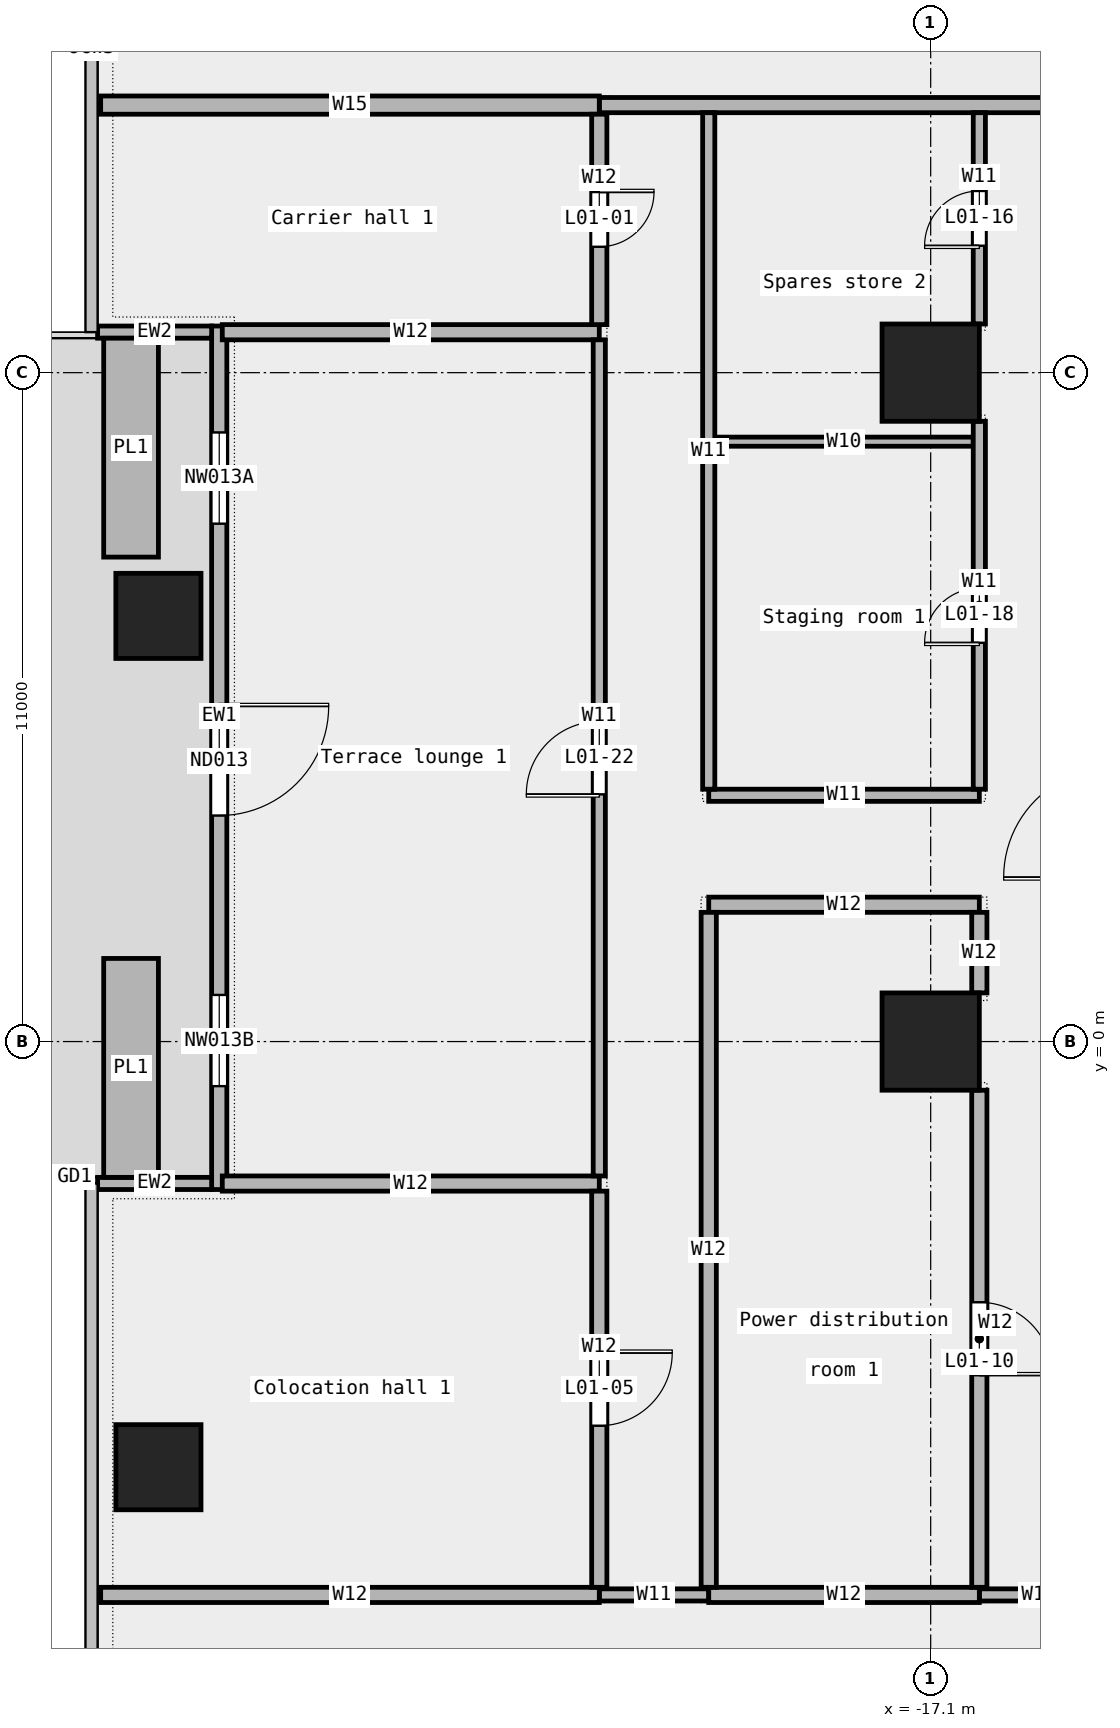
"""IFC4 building model, lengths in metres.
Left out: names, types, materials, properties, quantities, classifications, styles, units other than length and angle.
Written with IfcOpenShell. Run it as: python <this file> out.ifc"""

import sys

from ifc_helpers import new_model, si_unit, direction, frame, frame_2d, origin, origin_2d, place, context, subcontext, project, spatial, rectangle, extrude, element, fill, save


model = new_model("IFC4")
c1 = context("Model", 3, precision=1e-05, world=origin(), true_north=direction((0.0, 1.0)))
c2 = subcontext(c1, "Body", "Model", "MODEL_VIEW")
j1 = project(units=[si_unit("LENGTHUNIT", "METRE"), si_unit("PLANEANGLEUNIT", "RADIAN")], contexts=[c1])
p1 = place(None, origin())
s1 = spatial("IfcSite", under=j1, at=p1, CompositionType="ELEMENT")
p2 = place(p1, origin())
s2 = spatial("IfcBuilding", under=s1, at=p2, CompositionType="ELEMENT")
p3 = place(p2, frame((0.0, 0.0, 9.0)))
s3 = spatial("IfcBuildingStorey", under=s2, at=p3, CompositionType="ELEMENT", Elevation=9.0)
for number, where, z_axis, x_axis in (
    (1, (-29.8, 7.0, 0.0), (0.0, 0.0, 1.0), (1.0, 0.0, 0.0)),
    (2, (-29.8, -7.0, 0.0), (0.0, 0.0, 1.0), (1.0, 0.0, 0.0)),
):
    element("IfcColumn", number, at=place(p3, frame(where, z_axis=z_axis, x_axis=x_axis)), inside=s3, PredefinedType="COLUMN", context=c2, shape_type="SweptSolid", body=[
        extrude(rectangle(XDim=1.4, YDim=1.4, at=origin_2d()), origin(), (0.0, 0.0, 1.0), 5.0),
    ])
for number, where, z_axis, x_axis in (
    (3, (-17.1, 0.0, 0.0), (0.0, 0.0, 1.0), (1.0, 0.0, 0.0)),
    (4, (-17.1, 11.0, 0.0), (0.0, 0.0, 1.0), (1.0, 0.0, 0.0)),
):
    element("IfcColumn", number, at=place(p3, frame(where, z_axis=z_axis, x_axis=x_axis)), inside=s3, PredefinedType="COLUMN", context=c2, shape_type="SweptSolid", body=[
        extrude(rectangle(XDim=1.6, YDim=1.6, at=origin_2d()), origin(), (0.0, 0.0, 1.0), 5.0),
    ])
p4 = place(p3, frame((-28.8, 11.767, 0.0), z_axis=(0.0, 0.0, 1.0), x_axis=(0.0, -1.0, 0.0)))
e5 = element("IfcWall", 5, at=p4, inside=s3, PredefinedType="STANDARD", context=c2, shape_type="SweptSolid", body=[
    extrude(rectangle(XDim=14.2, YDim=0.25, at=frame_2d((7.1, 0.0))), origin(), (0.0, 0.0, 1.0), 5.0),
])
p5 = place(p4, frame((1.75, 0.0, 0.45)))
e6 = element("IfcOpeningElement", 6, at=p5, cuts=e5, PredefinedType="OPENING", context=c2, shape_type="SweptSolid", body=[
    extrude(rectangle(XDim=1.5, YDim=3.0, at=frame_2d((0.75, 1.5))), frame((0.0, 0.137, 0.0), z_axis=(0.0, -1.0, 0.0), x_axis=(1.0, 0.0, 0.0)), (0.0, 0.0, 1.0), 0.274),
])
p6 = place(p4, frame((6.25, 0.0, 0.0)))
e7 = element("IfcOpeningElement", 7, at=p6, cuts=e5, PredefinedType="OPENING", context=c2, shape_type="SweptSolid", body=[
    extrude(rectangle(XDim=1.8, YDim=2.4, at=frame_2d((0.9, 1.2))), frame((0.0, 0.137, 0.0), z_axis=(0.0, -1.0, 0.0), x_axis=(1.0, 0.0, 0.0)), (0.0, 0.0, 1.0), 0.274),
])
p7 = place(p4, frame((11.0, 0.0, 0.45)))
e8 = element("IfcOpeningElement", 8, at=p7, cuts=e5, PredefinedType="OPENING", context=c2, shape_type="SweptSolid", body=[
    extrude(rectangle(XDim=1.5, YDim=3.0, at=frame_2d((0.75, 1.5))), frame((0.0, 0.137, 0.0), z_axis=(0.0, -1.0, 0.0), x_axis=(1.0, 0.0, 0.0)), (0.0, 0.0, 1.0), 0.274),
])
for number, where, z_axis, x_axis in (
    (9, (-30.8, 11.667, 0.0), (0.0, 0.0, 1.0), (1.0, 0.0, 0.0)),
    (10, (-30.8, -2.333, 0.0), (0.0, 0.0, 1.0), (1.0, 0.0, 0.0)),
):
    element("IfcWall", number, at=place(p3, frame(where, z_axis=z_axis, x_axis=x_axis)), inside=s3, PredefinedType="STANDARD", context=c2, shape_type="SweptSolid", body=[
        extrude(rectangle(XDim=1.875, YDim=0.2, at=frame_2d((0.938, 0.0))), origin(), (0.0, 0.0, 1.0), 5.0),
    ])
for number, where, z_axis, x_axis in (
    (11, (-30.25, 11.567, 0.0), (0.0, 0.0, 1.0), (0.0, -1.0, 0.0)),
    (12, (-30.25, 1.367, 0.0), (0.0, 0.0, 1.0), (0.0, -1.0, 0.0)),
):
    element("IfcWall", number, at=place(p3, frame(where, z_axis=z_axis, x_axis=x_axis)), inside=s3, PredefinedType="STANDARD", context=c2, shape_type="SweptSolid", body=[
        extrude(rectangle(XDim=3.6, YDim=0.9, at=frame_2d((1.8, 0.0))), origin(), (0.0, 0.0, 1.0), 0.7),
    ])
p8 = place(p3, frame((-22.55, -9.1, 0.0), z_axis=(0.0, 0.0, 1.0), x_axis=(1.0, 0.0, 0.0)))
e13 = element("IfcWall", 13, at=p8, inside=s3, PredefinedType="PARTITIONING", context=c2, shape_type="SweptSolid", body=[
    extrude(rectangle(XDim=1.8, YDim=0.2, at=frame_2d((0.9, 0.0))), origin(), (0.0, 0.0, 1.0), 5.0),
])
p9 = place(p3, frame((-16.3, -9.1, 0.0), z_axis=(0.0, 0.0, 1.0), x_axis=(1.0, 0.0, 0.0)))
e14 = element("IfcWall", 14, at=p9, inside=s3, PredefinedType="PARTITIONING", context=c2, shape_type="SweptSolid", body=[
    extrude(rectangle(XDim=1.96, YDim=0.2, at=frame_2d((0.98, 0.0))), origin(), (0.0, 0.0, 1.0), 5.0),
])
p10 = place(p3, frame((-30.75, -9.1, 0.0), z_axis=(0.0, 0.0, 1.0), x_axis=(1.0, 0.0, 0.0)))
e15 = element("IfcWall", 15, at=p10, inside=s3, PredefinedType="PARTITIONING", context=c2, shape_type="SweptSolid", body=[
    extrude(rectangle(XDim=8.2, YDim=0.25, at=frame_2d((4.1, 0.0))), origin(), (0.0, 0.0, 1.0), 5.0),
])
p11 = place(p3, frame((-20.75, -9.1, 0.0), z_axis=(0.0, 0.0, 1.0), x_axis=(1.0, 0.0, 0.0)))
e16 = element("IfcWall", 16, at=p11, inside=s3, PredefinedType="PARTITIONING", context=c2, shape_type="SweptSolid", body=[
    extrude(rectangle(XDim=4.45, YDim=0.25, at=frame_2d((2.225, 0.0))), origin(), (0.0, 0.0, 1.0), 5.0),
])
p12 = place(p3, frame((-28.75, -2.335, 0.0), z_axis=(0.0, 0.0, 1.0), x_axis=(1.0, 0.0, 0.0)))
e17 = element("IfcWall", 17, at=p12, inside=s3, PredefinedType="PARTITIONING", context=c2, shape_type="SweptSolid", body=[
    extrude(rectangle(XDim=6.2, YDim=0.25, at=frame_2d((3.1, 0.0))), origin(), (0.0, 0.0, 1.0), 5.0),
])
p13 = place(p3, frame((-20.75, 2.25, 0.0), z_axis=(0.0, 0.0, 1.0), x_axis=(1.0, 0.0, 0.0)))
e18 = element("IfcWall", 18, at=p13, inside=s3, PredefinedType="PARTITIONING", context=c2, shape_type="SweptSolid", body=[
    extrude(rectangle(XDim=4.45, YDim=0.25, at=frame_2d((2.225, 0.0))), origin(), (0.0, 0.0, 1.0), 5.0),
])
p14 = place(p3, frame((-20.75, 4.05, 0.0), z_axis=(0.0, 0.0, 1.0), x_axis=(1.0, 0.0, 0.0)))
e19 = element("IfcWall", 19, at=p14, inside=s3, PredefinedType="PARTITIONING", context=c2, shape_type="SweptSolid", body=[
    extrude(rectangle(XDim=4.45, YDim=0.2, at=frame_2d((2.225, 0.0))), origin(), (0.0, 0.0, 1.0), 5.0),
])
p15 = place(p3, frame((-20.65, 9.865, 0.0), z_axis=(0.0, 0.0, 1.0), x_axis=(1.0, 0.0, 0.0)))
e20 = element("IfcWall", 20, at=p15, inside=s3, PredefinedType="PARTITIONING", context=c2, shape_type="SweptSolid", body=[
    extrude(rectangle(XDim=4.25, YDim=0.15, at=frame_2d((2.125, 0.0))), origin(), (0.0, 0.0, 1.0), 5.0),
])
p16 = place(p3, frame((-28.75, 11.665, 0.0), z_axis=(0.0, 0.0, 1.0), x_axis=(1.0, 0.0, 0.0)))
e21 = element("IfcWall", 21, at=p16, inside=s3, PredefinedType="PARTITIONING", context=c2, shape_type="SweptSolid", body=[
    extrude(rectangle(XDim=6.2, YDim=0.25, at=frame_2d((3.1, 0.0))), origin(), (0.0, 0.0, 1.0), 5.0),
])
p17 = place(p3, frame((-22.55, 15.4, 0.0), z_axis=(0.0, 0.0, 1.0), x_axis=(1.0, 0.0, 0.0)))
e22 = element("IfcWall", 22, at=p17, inside=s3, PredefinedType="PARTITIONING", context=c2, shape_type="SweptSolid", body=[
    extrude(rectangle(XDim=31.715, YDim=0.25, at=frame_2d((15.857, 0.0))), origin(), (0.0, 0.0, 1.0), 5.0),
])
p18 = place(p17, frame((12.485, 0.0, 0.0)))
e23 = element("IfcOpeningElement", 23, at=p18, cuts=e22, PredefinedType="OPENING", context=c2, shape_type="SweptSolid", body=[
    extrude(rectangle(XDim=1.8, YDim=2.1, at=frame_2d((0.9, 1.05))), frame((0.0, 0.137, 0.0), z_axis=(0.0, -1.0, 0.0), x_axis=(1.0, 0.0, 0.0)), (0.0, 0.0, 1.0), 0.274),
])
p19 = place(p17, frame((24.705, 0.0, 0.0)))
e24 = element("IfcOpeningElement", 24, at=p19, cuts=e22, PredefinedType="OPENING", context=c2, shape_type="SweptSolid", body=[
    extrude(rectangle(XDim=1.8, YDim=2.1, at=frame_2d((0.9, 1.05))), frame((0.0, 0.137, 0.0), z_axis=(0.0, -1.0, 0.0), x_axis=(1.0, 0.0, 0.0)), (0.0, 0.0, 1.0), 0.274),
])
p20 = place(p3, frame((-30.75, 15.4, 0.0), z_axis=(0.0, 0.0, 1.0), x_axis=(1.0, 0.0, 0.0)))
e25 = element("IfcWall", 25, at=p20, inside=s3, PredefinedType="PARTITIONING", context=c2, shape_type="SweptSolid", body=[
    extrude(rectangle(XDim=8.2, YDim=0.3, at=frame_2d((4.1, 0.0))), origin(), (0.0, 0.0, 1.0), 5.0),
])
p21 = place(p3, frame((-22.55, -2.21, 0.0), z_axis=(0.0, 0.0, 1.0), x_axis=(0.0, 1.0, 0.0)))
e26 = element("IfcWall", 26, at=p21, inside=s3, PredefinedType="PARTITIONING", context=c2, shape_type="SweptSolid", body=[
    extrude(rectangle(XDim=13.75, YDim=0.2, at=frame_2d((6.875, 0.0))), origin(), (0.0, 0.0, 1.0), 5.0),
])
p22 = place(p21, frame((6.275, 0.0, 0.0)))
e27 = element("IfcOpeningElement", 27, at=p22, cuts=e26, PredefinedType="OPENING", context=c2, shape_type="SweptSolid", body=[
    extrude(rectangle(XDim=1.2, YDim=2.1, at=frame_2d((0.6, 1.05))), frame((0.0, 0.112, 0.0), z_axis=(0.0, -1.0, 0.0), x_axis=(1.0, 0.0, 0.0)), (0.0, 0.0, 1.0), 0.224),
])
p23 = place(p3, frame((-22.55, -8.975, 0.0), z_axis=(0.0, 0.0, 1.0), x_axis=(0.0, 1.0, 0.0)))
e28 = element("IfcWall", 28, at=p23, inside=s3, PredefinedType="PARTITIONING", context=c2, shape_type="SweptSolid", body=[
    extrude(rectangle(XDim=6.515, YDim=0.25, at=frame_2d((3.258, 0.0))), origin(), (0.0, 0.0, 1.0), 5.0),
])
p24 = place(p23, frame((2.657, 0.0, 0.0)))
e29 = element("IfcOpeningElement", 29, at=p24, cuts=e28, PredefinedType="OPENING", context=c2, shape_type="SweptSolid", body=[
    extrude(rectangle(XDim=1.2, YDim=2.1, at=frame_2d((0.6, 1.05))), frame((0.0, 0.137, 0.0), z_axis=(0.0, -1.0, 0.0), x_axis=(1.0, 0.0, 0.0)), (0.0, 0.0, 1.0), 0.274),
])
p25 = place(p3, frame((-22.55, 11.79, 0.0), z_axis=(0.0, 0.0, 1.0), x_axis=(0.0, 1.0, 0.0)))
e30 = element("IfcWall", 30, at=p25, inside=s3, PredefinedType="PARTITIONING", context=c2, shape_type="SweptSolid", body=[
    extrude(rectangle(XDim=3.46, YDim=0.25, at=frame_2d((1.73, 0.0))), origin(), (0.0, 0.0, 1.0), 5.0),
])
p26 = place(p25, frame((1.28, 0.0, 0.0)))
e31 = element("IfcOpeningElement", 31, at=p26, cuts=e30, PredefinedType="OPENING", context=c2, shape_type="SweptSolid", body=[
    extrude(rectangle(XDim=0.9, YDim=2.1, at=frame_2d((0.45, 1.05))), frame((0.0, 0.137, 0.0), z_axis=(0.0, -1.0, 0.0), x_axis=(1.0, 0.0, 0.0)), (0.0, 0.0, 1.0), 0.274),
])
p27 = place(p3, frame((-20.75, 4.15, 0.0), z_axis=(0.0, 0.0, 1.0), x_axis=(0.0, 1.0, 0.0)))
e32 = element("IfcWall", 32, at=p27, inside=s3, PredefinedType="PARTITIONING", context=c2, shape_type="SweptSolid", body=[
    extrude(rectangle(XDim=11.125, YDim=0.2, at=frame_2d((5.562, 0.0))), origin(), (0.0, 0.0, 1.0), 5.0),
])
p28 = place(p3, frame((-20.75, -8.975, 0.0), z_axis=(0.0, 0.0, 1.0), x_axis=(0.0, 1.0, 0.0)))
e33 = element("IfcWall", 33, at=p28, inside=s3, PredefinedType="PARTITIONING", context=c2, shape_type="SweptSolid", body=[
    extrude(rectangle(XDim=11.1, YDim=0.25, at=frame_2d((5.55, 0.0))), origin(), (0.0, 0.0, 1.0), 5.0),
])
p29 = place(p3, frame((-16.3, 4.15, 0.0), z_axis=(0.0, 0.0, 1.0), x_axis=(0.0, 1.0, 0.0)))
e34 = element("IfcWall", 34, at=p29, inside=s3, PredefinedType="PARTITIONING", context=c2, shape_type="SweptSolid", body=[
    extrude(rectangle(XDim=6.05, YDim=0.2, at=frame_2d((3.025, 0.0))), origin(), (0.0, 0.0, 1.0), 5.0),
])
p30 = place(p29, frame((2.407, 0.0, 0.0)))
e35 = element("IfcOpeningElement", 35, at=p30, cuts=e34, PredefinedType="OPENING", context=c2, shape_type="SweptSolid", body=[
    extrude(rectangle(XDim=0.9, YDim=2.1, at=frame_2d((0.45, 1.05))), frame((0.0, 0.112, 0.0), z_axis=(0.0, -1.0, 0.0), x_axis=(1.0, 0.0, 0.0)), (0.0, 0.0, 1.0), 0.224),
])
p31 = place(p3, frame((-16.3, 11.8, 0.0), z_axis=(0.0, 0.0, 1.0), x_axis=(0.0, 1.0, 0.0)))
e36 = element("IfcWall", 36, at=p31, inside=s3, PredefinedType="PARTITIONING", context=c2, shape_type="SweptSolid", body=[
    extrude(rectangle(XDim=3.475, YDim=0.2, at=frame_2d((1.737, 0.0))), origin(), (0.0, 0.0, 1.0), 5.0),
])
p32 = place(p31, frame((1.288, 0.0, 0.0)))
e37 = element("IfcOpeningElement", 37, at=p32, cuts=e36, PredefinedType="OPENING", context=c2, shape_type="SweptSolid", body=[
    extrude(rectangle(XDim=0.9, YDim=2.1, at=frame_2d((0.45, 1.05))), frame((0.0, 0.112, 0.0), z_axis=(0.0, -1.0, 0.0), x_axis=(1.0, 0.0, 0.0)), (0.0, 0.0, 1.0), 0.224),
])
p33 = place(p3, frame((-16.3, -8.975, 0.0), z_axis=(0.0, 0.0, 1.0), x_axis=(0.0, 1.0, 0.0)))
e38 = element("IfcWall", 38, at=p33, inside=s3, PredefinedType="PARTITIONING", context=c2, shape_type="SweptSolid", body=[
    extrude(rectangle(XDim=8.175, YDim=0.25, at=frame_2d((4.087, 0.0))), origin(), (0.0, 0.0, 1.0), 5.0),
])
p34 = place(p33, frame((3.488, 0.0, 0.0)))
e39 = element("IfcOpeningElement", 39, at=p34, cuts=e38, PredefinedType="OPENING", context=c2, shape_type="SweptSolid", body=[
    extrude(rectangle(XDim=1.2, YDim=2.1, at=frame_2d((0.6, 1.05))), frame((0.0, 0.137, 0.0), z_axis=(0.0, -1.0, 0.0), x_axis=(1.0, 0.0, 0.0)), (0.0, 0.0, 1.0), 0.274),
])
p35 = place(p3, frame((-16.3, 0.8, 0.0), z_axis=(0.0, 0.0, 1.0), x_axis=(0.0, 1.0, 0.0)))
e40 = element("IfcWall", 40, at=p35, inside=s3, PredefinedType="PARTITIONING", context=c2, shape_type="SweptSolid", body=[
    extrude(rectangle(XDim=1.325, YDim=0.25, at=frame_2d((0.663, 0.0))), origin(), (0.0, 0.0, 1.0), 5.0),
])
p36 = place(p5, origin())
e41 = element("IfcWindow", 41, at=p36, inside=s3, PartitioningType="SINGLE_PANEL", PredefinedType="WINDOW", context=c2, shape_type="SweptSolid", body=[
    extrude(rectangle(XDim=1.5, YDim=3.0, at=frame_2d((0.75, 1.5))), frame((0.0, 0.03, 0.0), z_axis=(0.0, -1.0, 0.0), x_axis=(1.0, 0.0, 0.0)), (0.0, 0.0, 1.0), 0.06),
])
fill(e6, e41)
p37 = place(p6, origin())
e42 = element("IfcDoor", 42, at=p37, inside=s3, OperationType="DOUBLE_DOOR_SINGLE_SWING", PredefinedType="DOOR", context=c2, shape_type="SweptSolid", body=[
    extrude(rectangle(XDim=1.8, YDim=2.4, at=frame_2d((0.9, 1.2))), frame((0.0, 0.025, 0.0), z_axis=(0.0, -1.0, 0.0), x_axis=(1.0, 0.0, 0.0)), (0.0, 0.0, 1.0), 0.05),
])
fill(e7, e42)
p38 = place(p7, origin())
e43 = element("IfcWindow", 43, at=p38, inside=s3, PartitioningType="SINGLE_PANEL", PredefinedType="WINDOW", context=c2, shape_type="SweptSolid", body=[
    extrude(rectangle(XDim=1.5, YDim=3.0, at=frame_2d((0.75, 1.5))), frame((0.0, 0.03, 0.0), z_axis=(0.0, -1.0, 0.0), x_axis=(1.0, 0.0, 0.0)), (0.0, 0.0, 1.0), 0.06),
])
fill(e8, e43)
p39 = place(p26, origin())
e44 = element("IfcDoor", 44, at=p39, inside=s3, OperationType="SINGLE_SWING_LEFT", PredefinedType="DOOR", context=c2, shape_type="SweptSolid", body=[
    extrude(rectangle(XDim=0.9, YDim=2.1, at=frame_2d((0.45, 1.05))), frame((0.0, 0.025, 0.0), z_axis=(0.0, -1.0, 0.0), x_axis=(1.0, 0.0, 0.0)), (0.0, 0.0, 1.0), 0.05),
])
fill(e31, e44)
p40 = place(p24, origin())
e45 = element("IfcDoor", 45, at=p40, inside=s3, OperationType="SINGLE_SWING_LEFT", PredefinedType="DOOR", context=c2, shape_type="SweptSolid", body=[
    extrude(rectangle(XDim=1.2, YDim=2.1, at=frame_2d((0.6, 1.05))), frame((0.0, 0.025, 0.0), z_axis=(0.0, -1.0, 0.0), x_axis=(1.0, 0.0, 0.0)), (0.0, 0.0, 1.0), 0.05),
])
fill(e29, e45)
p41 = place(p34, origin())
e46 = element("IfcDoor", 46, at=p41, inside=s3, OperationType="SINGLE_SWING_RIGHT", PredefinedType="DOOR", context=c2, shape_type="SweptSolid", body=[
    extrude(rectangle(XDim=1.2, YDim=2.1, at=frame_2d((0.6, 1.05))), frame((0.0, 0.025, 0.0), z_axis=(0.0, -1.0, 0.0), x_axis=(1.0, 0.0, 0.0)), (0.0, 0.0, 1.0), 0.05),
])
fill(e39, e46)
p42 = place(p32, origin())
e47 = element("IfcDoor", 47, at=p42, inside=s3, OperationType="SINGLE_SWING_LEFT", PredefinedType="DOOR", context=c2, shape_type="SweptSolid", body=[
    extrude(rectangle(XDim=0.9, YDim=2.1, at=frame_2d((0.45, 1.05))), frame((0.0, 0.025, 0.0), z_axis=(0.0, -1.0, 0.0), x_axis=(1.0, 0.0, 0.0)), (0.0, 0.0, 1.0), 0.05),
])
fill(e37, e47)
p43 = place(p30, origin())
e48 = element("IfcDoor", 48, at=p43, inside=s3, OperationType="SINGLE_SWING_LEFT", PredefinedType="DOOR", context=c2, shape_type="SweptSolid", body=[
    extrude(rectangle(XDim=0.9, YDim=2.1, at=frame_2d((0.45, 1.05))), frame((0.0, 0.025, 0.0), z_axis=(0.0, -1.0, 0.0), x_axis=(1.0, 0.0, 0.0)), (0.0, 0.0, 1.0), 0.05),
])
fill(e35, e48)
p44 = place(p22, origin())
e49 = element("IfcDoor", 49, at=p44, inside=s3, OperationType="SINGLE_SWING_LEFT", PredefinedType="DOOR", context=c2, shape_type="SweptSolid", body=[
    extrude(rectangle(XDim=1.2, YDim=2.1, at=frame_2d((0.6, 1.05))), frame((0.0, 0.025, 0.0), z_axis=(0.0, -1.0, 0.0), x_axis=(1.0, 0.0, 0.0)), (0.0, 0.0, 1.0), 0.05),
])
fill(e27, e49)
save(model, sys.argv[1])
